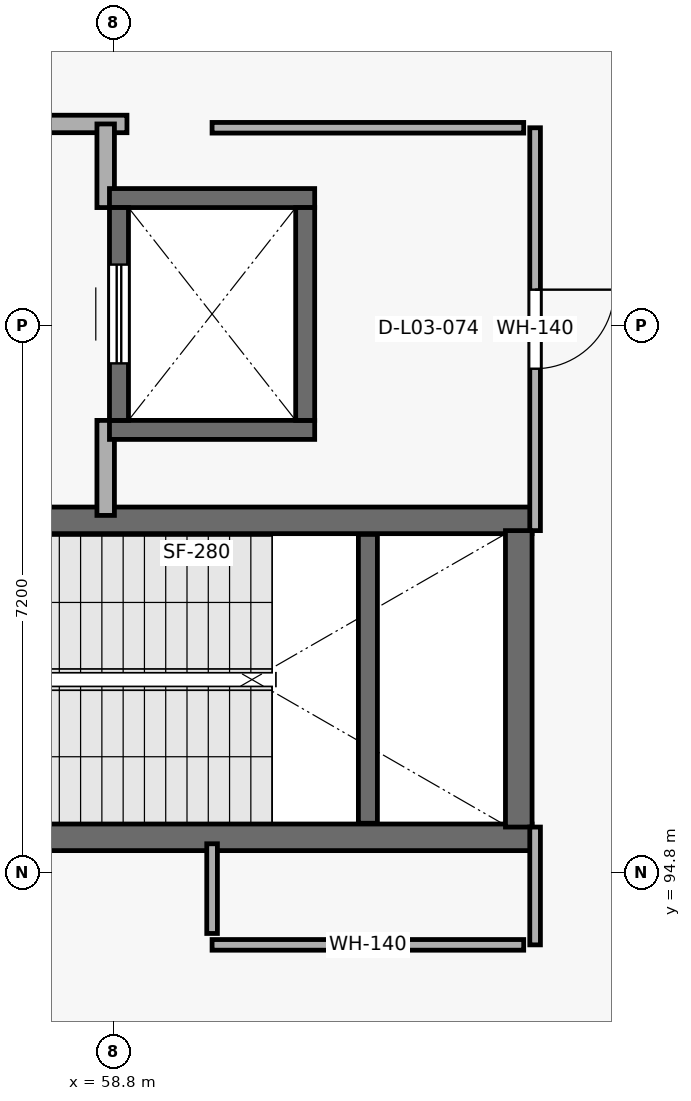
"""IFC4 building model, lengths in metres.
Left out: names, types, materials, properties, quantities, classifications, styles, units other than length and angle.
Written with IfcOpenShell. Run it as: python <this file> out.ifc"""

import sys

from ifc_helpers import new_model, si_unit, direction, frame, frame_2d, origin, place, context, subcontext, project, spatial, rectangle, extrude, element, fill, save


model = new_model("IFC4")
c1 = context("Model", 3, precision=1e-05, world=origin(), true_north=direction((0.0, 1.0)))
c2 = subcontext(c1, "Body", "Model", "MODEL_VIEW")
j1 = project(units=[si_unit("LENGTHUNIT", "METRE"), si_unit("PLANEANGLEUNIT", "RADIAN")], contexts=[c1])
p1 = place(None, origin())
s1 = spatial("IfcSite", under=j1, at=p1, CompositionType="ELEMENT")
p2 = place(p1, origin())
s2 = spatial("IfcBuilding", under=s1, at=p2, CompositionType="ELEMENT")
p3 = place(p2, frame((0.0, 0.0, 10.2)))
s3 = spatial("IfcBuildingStorey", under=s2, at=p3, CompositionType="ELEMENT", Elevation=10.2)
p4 = place(p3, frame((55.09, 95.265, 0.0), z_axis=(0.0, 0.0, 1.0), x_axis=(1.0, 0.0, 0.0)))
e1 = element("IfcWall", 1, at=p4, inside=s3, PredefinedType="SHEAR", context=c2, shape_type="SweptSolid", body=[
    extrude(rectangle(XDim=9.22, YDim=0.35, at=frame_2d((4.61, 0.0))), origin(), (0.0, 0.0, 1.0), 4.82),
])
p5 = place(p4, frame((0.45, 0.0, 0.0)))
e2 = element("IfcOpeningElement", 2, at=p5, cuts=e1, PredefinedType="OPENING", context=c2, shape_type="SweptSolid", body=[
    extrude(rectangle(XDim=1.25, YDim=2.2, at=frame_2d((0.625, 1.1))), frame((0.0, 0.185, 0.0), z_axis=(0.0, -1.0, 0.0), x_axis=(1.0, 0.0, 0.0)), (0.0, 0.0, 1.0), 0.37),
])
p6 = place(p3, frame((64.31, 99.435, 0.0), z_axis=(0.0, 0.0, 1.0), x_axis=(-1.0, 0.0, 0.0)))
e3 = element("IfcWall", 3, at=p6, inside=s3, PredefinedType="SHEAR", context=c2, shape_type="SweptSolid", body=[
    extrude(rectangle(XDim=9.22, YDim=0.35, at=frame_2d((4.61, 0.0))), origin(), (0.0, 0.0, 1.0), 4.82),
])
p7 = place(p6, frame((7.72, 0.0, 0.0)))
e4 = element("IfcOpeningElement", 4, at=p7, cuts=e3, PredefinedType="OPENING", context=c2, shape_type="SweptSolid", body=[
    extrude(rectangle(XDim=1.2, YDim=2.2, at=frame_2d((0.6, 1.1))), frame((0.0, 0.185, 0.0), z_axis=(0.0, -1.0, 0.0), x_axis=(1.0, 0.0, 0.0)), (0.0, 0.0, 1.0), 0.37),
])
p8 = place(p3, frame((64.135, 99.3, 0.0), z_axis=(0.0, 0.0, 1.0), x_axis=(0.0, -1.0, 0.0)))
e5 = element("IfcWall", 5, at=p8, inside=s3, PredefinedType="SHEAR", context=c2, shape_type="SweptSolid", body=[
    extrude(rectangle(XDim=3.9, YDim=0.35, at=frame_2d((1.95, 0.0))), origin(), (0.0, 0.0, 1.0), 4.82),
])
p9 = place(p3, frame((62.15, 95.45, 0.0), z_axis=(0.0, 0.0, 1.0), x_axis=(0.0, 1.0, 0.0)))
e6 = element("IfcWall", 6, at=p9, inside=s3, PredefinedType="SHEAR", context=c2, shape_type="SweptSolid", body=[
    extrude(rectangle(XDim=3.8, YDim=0.25, at=frame_2d((1.9, 0.0))), origin(), (0.0, 0.0, 1.0), 2.37),
])
p10 = place(p3, frame((55.09, 104.65, 0.0), z_axis=(0.0, 0.0, 1.0), x_axis=(1.0, 0.0, 0.0)))
e7 = element("IfcWall", 7, at=p10, inside=s3, PredefinedType="PARTITIONING", context=c2, shape_type="SweptSolid", body=[
    extrude(rectangle(XDim=3.89, YDim=0.23, at=frame_2d((1.945, 0.0))), origin(), (0.0, 0.0, 1.0), 4.82),
])
p11 = place(p10, frame((1.15, 0.0, 0.0)))
e8 = element("IfcOpeningElement", 8, at=p11, cuts=e7, PredefinedType="OPENING", context=c2, shape_type="SweptSolid", body=[
    extrude(rectangle(XDim=1.2, YDim=2.2, at=frame_2d((0.6, 1.1))), frame((0.0, 0.125, 0.0), z_axis=(0.0, -1.0, 0.0), x_axis=(1.0, 0.0, 0.0)), (0.0, 0.0, 1.0), 0.25),
])
p12 = place(p3, frame((58.7, 104.65, 0.0), z_axis=(0.0, 0.0, 1.0), x_axis=(0.0, -1.0, 0.0)))
e9 = element("IfcWall", 9, at=p12, inside=s3, PredefinedType="PARTITIONING", context=c2, shape_type="SweptSolid", body=[
    extrude(rectangle(XDim=1.1, YDim=0.23, at=frame_2d((0.55, 0.0))), origin(), (0.0, 0.0, 1.0), 4.82),
])
p13 = place(p3, frame((58.7, 100.75, 0.0), z_axis=(0.0, 0.0, 1.0), x_axis=(0.0, -1.0, 0.0)))
e10 = element("IfcWall", 10, at=p13, inside=s3, PredefinedType="PARTITIONING", context=c2, shape_type="SweptSolid", body=[
    extrude(rectangle(XDim=1.25, YDim=0.23, at=frame_2d((0.625, 0.0))), origin(), (0.0, 0.0, 1.0), 4.82),
])
for number, where, z_axis, x_axis in (
    (11, (58.75, 100.625, 0.0), (0.0, 0.0, 1.0), (1.0, 0.0, 0.0)),
    (12, (61.45, 103.675, 0.0), (0.0, 0.0, 1.0), (-1.0, 0.0, 0.0)),
):
    element("IfcWall", number, at=place(p3, frame(where, z_axis=z_axis, x_axis=x_axis)), inside=s3, PredefinedType="SHEAR", context=c2, shape_type="SweptSolid", body=[
        extrude(rectangle(XDim=2.7, YDim=0.25, at=frame_2d((1.35, 0.0))), origin(), (0.0, 0.0, 1.0), 4.82),
    ])
p14 = place(p3, frame((58.875, 100.75, 0.0), z_axis=(0.0, 0.0, 1.0), x_axis=(0.0, 1.0, 0.0)))
e13 = element("IfcWall", 13, at=p14, inside=s3, PredefinedType="SHEAR", context=c2, shape_type="SweptSolid", body=[
    extrude(rectangle(XDim=2.8, YDim=0.25, at=frame_2d((1.4, 0.0))), origin(), (0.0, 0.0, 1.0), 4.82),
])
p15 = place(p14, frame((0.75, 0.0, 0.0)))
e14 = element("IfcOpeningElement", 14, at=p15, cuts=e13, PredefinedType="OPENING", context=c2, shape_type="SweptSolid", body=[
    extrude(rectangle(XDim=1.3, YDim=2.25, at=frame_2d((0.65, 1.125))), frame((0.0, 0.135, 0.0), z_axis=(0.0, -1.0, 0.0), x_axis=(1.0, 0.0, 0.0)), (0.0, 0.0, 1.0), 0.27),
])
p16 = place(p3, frame((61.325, 103.55, 0.0), z_axis=(0.0, 0.0, 1.0), x_axis=(0.0, -1.0, 0.0)))
e15 = element("IfcWall", 15, at=p16, inside=s3, PredefinedType="SHEAR", context=c2, shape_type="SweptSolid", body=[
    extrude(rectangle(XDim=2.8, YDim=0.25, at=frame_2d((1.4, 0.0))), origin(), (0.0, 0.0, 1.0), 4.82),
])
p17 = place(p3, frame((64.35, 104.6, 0.0), z_axis=(0.0, 0.0, 1.0), x_axis=(0.0, -1.0, 0.0)))
e16 = element("IfcWall", 16, at=p17, inside=s3, PredefinedType="PARTITIONING", context=c2, shape_type="SweptSolid", body=[
    extrude(rectangle(XDim=5.3, YDim=0.14, at=frame_2d((2.65, 0.0))), origin(), (0.0, 0.0, 1.0), 4.82),
])
p18 = place(p17, frame((2.13, 0.0, 0.0)))
e17 = element("IfcOpeningElement", 17, at=p18, cuts=e16, PredefinedType="OPENING", context=c2, shape_type="SweptSolid", body=[
    extrude(rectangle(XDim=1.04, YDim=2.26, at=frame_2d((0.52, 1.13))), frame((0.0, 0.08, 0.0), z_axis=(0.0, -1.0, 0.0), x_axis=(1.0, 0.0, 0.0)), (0.0, 0.0, 1.0), 0.16),
])
p19 = place(p3, frame((64.35, 95.4, 0.0), z_axis=(0.0, 0.0, 1.0), x_axis=(0.0, -1.0, 0.0)))
e18 = element("IfcWall", 18, at=p19, inside=s3, PredefinedType="PARTITIONING", context=c2, shape_type="SweptSolid", body=[
    extrude(rectangle(XDim=1.55, YDim=0.14, at=frame_2d((0.775, 0.0))), origin(), (0.0, 0.0, 1.0), 4.82),
])
for number, where, z_axis, x_axis in (
    (19, (60.1, 104.6, 0.0), (0.0, 0.0, 1.0), (1.0, 0.0, 0.0)),
    (20, (64.2, 93.85, 0.0), (0.0, 0.0, 1.0), (-1.0, 0.0, 0.0)),
):
    element("IfcWall", number, at=place(p3, frame(where, z_axis=z_axis, x_axis=x_axis)), inside=s3, PredefinedType="PARTITIONING", context=c2, shape_type="SweptSolid", body=[
        extrude(rectangle(XDim=4.1, YDim=0.14, at=frame_2d((2.05, 0.0))), origin(), (0.0, 0.0, 1.0), 4.82),
    ])
p20 = place(p3, frame((60.1, 94.0, 0.0), z_axis=(0.0, 0.0, 1.0), x_axis=(0.0, 1.0, 0.0)))
e21 = element("IfcWall", 21, at=p20, inside=s3, PredefinedType="PARTITIONING", context=c2, shape_type="SweptSolid", body=[
    extrude(rectangle(XDim=1.18, YDim=0.14, at=frame_2d((0.59, 0.0))), origin(), (0.0, 0.0, 1.0), 4.82),
])
p21 = place(p15, origin())
e22 = element("IfcDoor", 22, at=p21, inside=s3, OperationType="SLIDING_TO_RIGHT", PredefinedType="DOOR", context=c2, shape_type="SweptSolid", body=[
    extrude(rectangle(XDim=1.3, YDim=2.25, at=frame_2d((0.65, 1.125))), frame((0.0, 0.025, 0.0), z_axis=(0.0, -1.0, 0.0), x_axis=(1.0, 0.0, 0.0)), (0.0, 0.0, 1.0), 0.05),
])
fill(e14, e22)
p22 = place(p18, origin())
e23 = element("IfcDoor", 23, at=p22, inside=s3, OperationType="SINGLE_SWING_LEFT", PredefinedType="DOOR", context=c2, shape_type="SweptSolid", body=[
    extrude(rectangle(XDim=1.04, YDim=2.26, at=frame_2d((0.52, 1.13))), frame((0.0, 0.025, 0.0), z_axis=(0.0, -1.0, 0.0), x_axis=(1.0, 0.0, 0.0)), (0.0, 0.0, 1.0), 0.05),
])
fill(e17, e23)
save(model, sys.argv[1])
